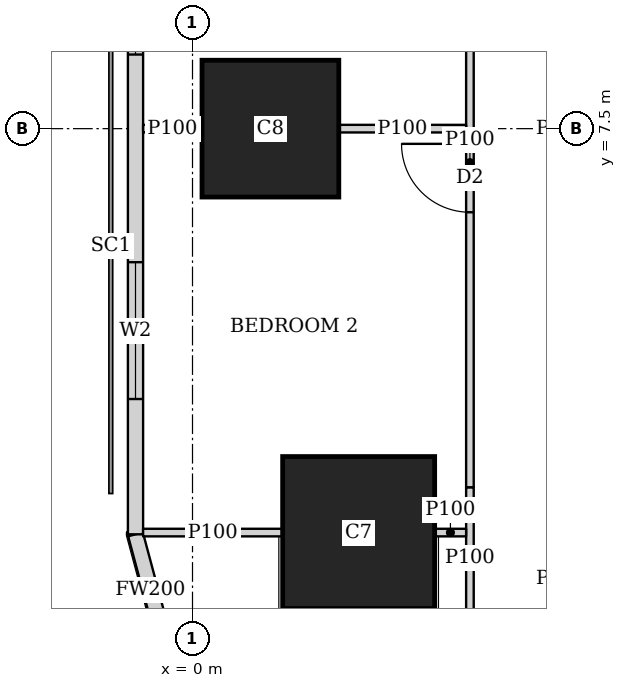
"""IFC4 building model, lengths in metres.
Left out: names, types, materials, properties, quantities, classifications, styles, units other than length and angle.
Written with IfcOpenShell. Run it as: python <this file> out.ifc"""

import sys

from ifc_helpers import new_model, si_unit, direction, frame, frame_2d, origin, origin_2d, place, context, subcontext, project, spatial, rectangle, extrude, element, fill, save


model = new_model("IFC4")
c1 = context("Model", 3, precision=1e-05, world=origin(), true_north=direction((0.0, 1.0)))
c2 = subcontext(c1, "Body", "Model", "MODEL_VIEW")
j1 = project(units=[si_unit("LENGTHUNIT", "METRE"), si_unit("PLANEANGLEUNIT", "RADIAN")], contexts=[c1])
p1 = place(None, origin())
s1 = spatial("IfcSite", under=j1, at=p1, CompositionType="ELEMENT")
p2 = place(p1, origin())
s2 = spatial("IfcBuilding", under=s1, at=p2, CompositionType="ELEMENT")
p3 = place(p2, frame((0.0, 0.0, 169.55)))
s3 = spatial("IfcBuildingStorey", under=s2, at=p3, CompositionType="ELEMENT", Elevation=169.55)
p4 = place(p3, frame((2.186, 2.186, 0.0), z_axis=(0.0, 0.0, 1.0), x_axis=(1.0, 0.0, 0.0)))
e1 = element("IfcColumn", 1, at=p4, inside=s3, PredefinedType="COLUMN", context=c2, shape_type="SweptSolid", body=[
    extrude(rectangle(XDim=2.0, YDim=2.0, at=origin_2d()), origin(), (0.0, 0.0, 1.0), 3.75),
])
p5 = place(p3, frame((1.025, 7.5, 0.0), z_axis=(0.0, 0.0, 1.0), x_axis=(1.0, 0.0, 0.0)))
e2 = element("IfcColumn", 2, at=p5, inside=s3, PredefinedType="COLUMN", context=c2, shape_type="SweptSolid", body=[
    extrude(rectangle(XDim=1.8, YDim=1.8, at=origin_2d()), origin(), (0.0, 0.0, 1.0), 3.75),
])
p6 = place(p3, frame((-0.75, 42.837, 0.0), z_axis=(0.0, 0.0, 1.0), x_axis=(0.0, -1.0, 0.0)))
e3 = element("IfcWall", 3, at=p6, inside=s3, PredefinedType="SOLIDWALL", context=c2, shape_type="SweptSolid", body=[
    extrude(rectangle(XDim=40.674, YDim=0.2, at=frame_2d((20.337, 0.0))), origin(), (0.0, 0.0, 1.0), 3.5),
])
p7 = place(p6, frame((1.78, 0.0, 0.9)))
e4 = element("IfcOpeningElement", 4, at=p7, cuts=e3, PredefinedType="OPENING", context=c2, shape_type="SweptSolid", body=[
    extrude(rectangle(XDim=1.8, YDim=1.5, at=frame_2d((0.9, 0.75))), frame((0.0, 0.11, 0.0), z_axis=(0.0, -1.0, 0.0), x_axis=(1.0, 0.0, 0.0)), (0.0, 0.0, 1.0), 0.22),
])
p8 = place(p6, frame((6.312, 0.0, 0.9)))
e5 = element("IfcOpeningElement", 5, at=p8, cuts=e3, PredefinedType="OPENING", context=c2, shape_type="SweptSolid", body=[
    extrude(rectangle(XDim=1.8, YDim=1.5, at=frame_2d((0.9, 0.75))), frame((0.0, 0.11, 0.0), z_axis=(0.0, -1.0, 0.0), x_axis=(1.0, 0.0, 0.0)), (0.0, 0.0, 1.0), 0.22),
])
p9 = place(p6, frame((10.062, 0.0, 0.9)))
e6 = element("IfcOpeningElement", 6, at=p9, cuts=e3, PredefinedType="OPENING", context=c2, shape_type="SweptSolid", body=[
    extrude(rectangle(XDim=1.8, YDim=1.5, at=frame_2d((0.9, 0.75))), frame((0.0, 0.11, 0.0), z_axis=(0.0, -1.0, 0.0), x_axis=(1.0, 0.0, 0.0)), (0.0, 0.0, 1.0), 0.22),
])
p10 = place(p6, frame((13.812, 0.0, 0.9)))
e7 = element("IfcOpeningElement", 7, at=p10, cuts=e3, PredefinedType="OPENING", context=c2, shape_type="SweptSolid", body=[
    extrude(rectangle(XDim=1.8, YDim=1.5, at=frame_2d((0.9, 0.75))), frame((0.0, 0.11, 0.0), z_axis=(0.0, -1.0, 0.0), x_axis=(1.0, 0.0, 0.0)), (0.0, 0.0, 1.0), 0.22),
])
p11 = place(p6, frame((17.562, 0.0, 0.9)))
e8 = element("IfcOpeningElement", 8, at=p11, cuts=e3, PredefinedType="OPENING", context=c2, shape_type="SweptSolid", body=[
    extrude(rectangle(XDim=1.8, YDim=1.5, at=frame_2d((0.9, 0.75))), frame((0.0, 0.11, 0.0), z_axis=(0.0, -1.0, 0.0), x_axis=(1.0, 0.0, 0.0)), (0.0, 0.0, 1.0), 0.22),
])
p12 = place(p6, frame((21.312, 0.0, 0.9)))
e9 = element("IfcOpeningElement", 9, at=p12, cuts=e3, PredefinedType="OPENING", context=c2, shape_type="SweptSolid", body=[
    extrude(rectangle(XDim=1.8, YDim=1.5, at=frame_2d((0.9, 0.75))), frame((0.0, 0.11, 0.0), z_axis=(0.0, -1.0, 0.0), x_axis=(1.0, 0.0, 0.0)), (0.0, 0.0, 1.0), 0.22),
])
p13 = place(p6, frame((25.062, 0.0, 0.9)))
e10 = element("IfcOpeningElement", 10, at=p13, cuts=e3, PredefinedType="OPENING", context=c2, shape_type="SweptSolid", body=[
    extrude(rectangle(XDim=1.8, YDim=1.5, at=frame_2d((0.9, 0.75))), frame((0.0, 0.11, 0.0), z_axis=(0.0, -1.0, 0.0), x_axis=(1.0, 0.0, 0.0)), (0.0, 0.0, 1.0), 0.22),
])
p14 = place(p6, frame((28.812, 0.0, 0.9)))
e11 = element("IfcOpeningElement", 11, at=p14, cuts=e3, PredefinedType="OPENING", context=c2, shape_type="SweptSolid", body=[
    extrude(rectangle(XDim=1.8, YDim=1.5, at=frame_2d((0.9, 0.75))), frame((0.0, 0.11, 0.0), z_axis=(0.0, -1.0, 0.0), x_axis=(1.0, 0.0, 0.0)), (0.0, 0.0, 1.0), 0.22),
])
p15 = place(p6, frame((32.562, 0.0, 0.9)))
e12 = element("IfcOpeningElement", 12, at=p15, cuts=e3, PredefinedType="OPENING", context=c2, shape_type="SweptSolid", body=[
    extrude(rectangle(XDim=1.8, YDim=1.5, at=frame_2d((0.9, 0.75))), frame((0.0, 0.11, 0.0), z_axis=(0.0, -1.0, 0.0), x_axis=(1.0, 0.0, 0.0)), (0.0, 0.0, 1.0), 0.22),
])
p16 = place(p6, frame((37.094, 0.0, 0.9)))
e13 = element("IfcOpeningElement", 13, at=p16, cuts=e3, PredefinedType="OPENING", context=c2, shape_type="SweptSolid", body=[
    extrude(rectangle(XDim=1.8, YDim=1.5, at=frame_2d((0.9, 0.75))), frame((0.0, 0.11, 0.0), z_axis=(0.0, -1.0, 0.0), x_axis=(1.0, 0.0, 0.0)), (0.0, 0.0, 1.0), 0.22),
])
p17 = place(p3, frame((-0.75, 2.163, 0.0), z_axis=(0.0, 0.0, 1.0), x_axis=(0.259168954497, -0.965832000415, 0.0)))
e14 = element("IfcWall", 14, at=p17, inside=s3, PredefinedType="SOLIDWALL", context=c2, shape_type="SweptSolid", body=[
    extrude(rectangle(XDim=1.513, YDim=0.2, at=frame_2d((0.756, 0.0))), origin(), (0.0, 0.0, 1.0), 3.5),
])
p18 = place(p3, frame((3.65, 0.912, 0.0), z_axis=(0.0, 0.0, 1.0), x_axis=(0.0, 1.0, 0.0)))
e15 = element("IfcWall", 15, at=p18, inside=s3, PredefinedType="PARTITIONING", context=c2, shape_type="SweptSolid", body=[
    extrude(rectangle(XDim=1.87, YDim=0.1, at=frame_2d((0.935, 0.0))), origin(), (0.0, 0.0, 1.0), 2.1),
])
p19 = place(p3, frame((3.65, 2.782, 0.0), z_axis=(0.0, 0.0, 1.0), x_axis=(0.0, 1.0, 0.0)))
e16 = element("IfcWall", 16, at=p19, inside=s3, PredefinedType="PARTITIONING", context=c2, shape_type="SweptSolid", body=[
    extrude(rectangle(XDim=8.541, YDim=0.1, at=frame_2d((4.271, 0.0))), origin(), (0.0, 0.0, 1.0), 3.5),
])
p20 = place(p19, frame((7.368, 0.0, 0.0)))
e17 = element("IfcOpeningElement", 17, at=p20, cuts=e16, PredefinedType="OPENING", context=c2, shape_type="SweptSolid", body=[
    extrude(rectangle(XDim=0.9, YDim=2.1, at=frame_2d((0.45, 1.05))), frame((0.0, 0.06, 0.0), z_axis=(0.0, -1.0, 0.0), x_axis=(1.0, 0.0, 0.0)), (0.0, 0.0, 1.0), 0.12),
])
p21 = place(p19, frame((3.618, 0.0, 0.0)))
e18 = element("IfcOpeningElement", 18, at=p21, cuts=e16, PredefinedType="OPENING", context=c2, shape_type="SweptSolid", body=[
    extrude(rectangle(XDim=0.9, YDim=2.1, at=frame_2d((0.45, 1.05))), frame((0.0, 0.06, 0.0), z_axis=(0.0, -1.0, 0.0), x_axis=(1.0, 0.0, 0.0)), (0.0, 0.0, 1.0), 0.12),
])
p22 = place(p3, frame((-0.65, 2.186, 0.0), z_axis=(0.0, 0.0, 1.0), x_axis=(1.0, 0.0, 0.0)))
e19 = element("IfcWall", 19, at=p22, inside=s3, PredefinedType="PARTITIONING", context=c2, shape_type="SweptSolid", body=[
    extrude(rectangle(XDim=1.835, YDim=0.1, at=frame_2d((0.917, 0.0))), origin(), (0.0, 0.0, 1.0), 3.5),
])
p23 = place(p3, frame((3.187, 2.186, 0.0), z_axis=(0.0, 0.0, 1.0), x_axis=(1.0, 0.0, 0.0)))
e20 = element("IfcWall", 20, at=p23, inside=s3, PredefinedType="PARTITIONING", context=c2, shape_type="SweptSolid", body=[
    extrude(rectangle(XDim=0.413, YDim=0.1, at=frame_2d((0.207, 0.0))), origin(), (0.0, 0.0, 1.0), 2.1),
])
p24 = place(p3, frame((-0.65, 7.5, 0.0), z_axis=(0.0, 0.0, 1.0), x_axis=(1.0, 0.0, 0.0)))
e21 = element("IfcWall", 21, at=p24, inside=s3, PredefinedType="PARTITIONING", context=c2, shape_type="SweptSolid", body=[
    extrude(rectangle(XDim=0.774, YDim=0.1, at=frame_2d((0.387, 0.0))), origin(), (0.0, 0.0, 1.0), 3.5),
])
p25 = place(p3, frame((1.926, 7.5, 0.0), z_axis=(0.0, 0.0, 1.0), x_axis=(1.0, 0.0, 0.0)))
e22 = element("IfcWall", 22, at=p25, inside=s3, PredefinedType="PARTITIONING", context=c2, shape_type="SweptSolid", body=[
    extrude(rectangle(XDim=1.674, YDim=0.1, at=frame_2d((0.837, 0.0))), origin(), (0.0, 0.0, 1.0), 2.1),
])
p26 = place(p15, origin())
e23 = element("IfcWindow", 23, at=p26, inside=s3, PartitioningType="SINGLE_PANEL", PredefinedType="WINDOW", context=c2, shape_type="SweptSolid", body=[
    extrude(rectangle(XDim=1.8, YDim=1.5, at=frame_2d((0.9, 0.75))), frame((0.0, 0.03, 0.0), z_axis=(0.0, -1.0, 0.0), x_axis=(1.0, 0.0, 0.0)), (0.0, 0.0, 1.0), 0.06),
])
fill(e12, e23)
p27 = place(p16, origin())
e24 = element("IfcWindow", 24, at=p27, inside=s3, PartitioningType="SINGLE_PANEL", PredefinedType="WINDOW", context=c2, shape_type="SweptSolid", body=[
    extrude(rectangle(XDim=1.8, YDim=1.5, at=frame_2d((0.9, 0.75))), frame((0.0, 0.03, 0.0), z_axis=(0.0, -1.0, 0.0), x_axis=(1.0, 0.0, 0.0)), (0.0, 0.0, 1.0), 0.06),
])
fill(e13, e24)
p28 = place(p21, origin())
e25 = element("IfcDoor", 25, at=p28, inside=s3, OperationType="SINGLE_SWING_RIGHT", PredefinedType="DOOR", context=c2, shape_type="SweptSolid", body=[
    extrude(rectangle(XDim=0.9, YDim=2.1, at=frame_2d((0.45, 1.05))), frame((0.0, 0.025, 0.0), z_axis=(0.0, -1.0, 0.0), x_axis=(1.0, 0.0, 0.0)), (0.0, 0.0, 1.0), 0.05),
])
fill(e18, e25)
save(model, sys.argv[1])
